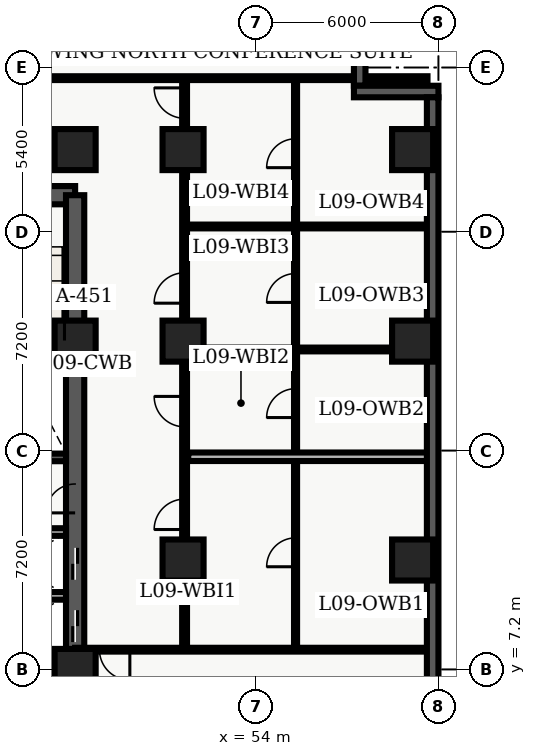
"""IFC4 building model, lengths in metres.
Left out: names, types, materials, properties, quantities, classifications, styles, units other than length and angle.
Written with IfcOpenShell. Run it as: python <this file> out.ifc"""

import sys

from ifc_helpers import new_model, entity, si_unit, converted_unit, direction, frame, origin_with_axes, origin_2d_with_axis, place, context, subcontext, project, spatial, polyline, rectangle, outline, extrude, element, fill, save


model = new_model("IFC4")
c1 = context("Model", 3, precision=1e-05, world=origin_with_axes(), true_north=direction((0.0, 1.0)))
c2 = subcontext(c1, "Body", "Model", "MODEL_VIEW")
j1 = project(units=[si_unit("LENGTHUNIT", "METRE"), converted_unit("PLANEANGLEUNIT", "DEGREE", entity("IfcPlaneAngleMeasure", 0.017), si_unit("PLANEANGLEUNIT", "RADIAN"), dimensions=[0, 0, 0, 0, 0, 0, 0])], contexts=[c1])
p1 = place(None, origin_with_axes())
s1 = spatial("IfcSite", under=j1, at=p1, CompositionType="ELEMENT")
p2 = place(p1, origin_with_axes())
s2 = spatial("IfcBuilding", under=s1, at=p2, CompositionType="ELEMENT")
p3 = place(p2, frame((0.0, 0.0, 40.5), z_axis=(0.0, 0.0, 1.0), x_axis=(1.0, 0.0, 0.0)))
s3 = spatial("IfcBuildingStorey", under=s2, at=p3, CompositionType="ELEMENT", Elevation=40.5)
p4 = place(p3, frame((40.2, 7.2, 0.0), z_axis=(0.0, 0.0, 1.0), x_axis=(1.0, 0.0, 0.0)))
e1 = element("IfcWall", 1, at=p4, inside=s3, PredefinedType="SHEAR", context=c2, shape_type="SweptSolid", body=[
    extrude(outline(polyline([(0.0, -0.3), (7.85, -0.3), (7.85, 0.3), (0.0, 0.3), (0.0, -0.3)])), origin_with_axes(), (0.0, 0.0, 1.0), 3.66),
])
p5 = place(p4, frame((2.175, 0.0, 0.0), z_axis=(0.0, 0.0, 1.0), x_axis=(1.0, 0.0, 0.0)))
e2 = element("IfcOpeningElement", 2, at=p5, cuts=e1, PredefinedType="OPENING", context=c2, shape_type="SweptSolid", body=[
    extrude(rectangle(XDim=1.05, YDim=0.62, at=origin_2d_with_axis()), origin_with_axes(), (0.0, 0.0, 1.0), 2.15),
])
p6 = place(p3, frame((40.2, 22.8, 0.0), z_axis=(0.0, 0.0, 1.0), x_axis=(1.0, 0.0, 0.0)))
e3 = element("IfcWall", 3, at=p6, inside=s3, PredefinedType="SHEAR", context=c2, shape_type="SweptSolid", body=[
    extrude(outline(polyline([(0.0, -0.3), (7.85, -0.3), (7.85, 0.3), (0.0, 0.3), (0.0, -0.3)])), origin_with_axes(), (0.0, 0.0, 1.0), 3.66),
])
p7 = place(p6, frame((5.775, 0.0, 0.0), z_axis=(0.0, 0.0, 1.0), x_axis=(1.0, 0.0, 0.0)))
e4 = element("IfcOpeningElement", 4, at=p7, cuts=e3, PredefinedType="OPENING", context=c2, shape_type="SweptSolid", body=[
    extrude(rectangle(XDim=1.05, YDim=0.62, at=origin_2d_with_axis()), origin_with_axes(), (0.0, 0.0, 1.0), 2.15),
])
p8 = place(p6, frame((2.15, 0.0, 0.0), z_axis=(0.0, 0.0, 1.0), x_axis=(1.0, 0.0, 0.0)))
e5 = element("IfcOpeningElement", 5, at=p8, cuts=e3, PredefinedType="OPENING", context=c2, shape_type="SweptSolid", body=[
    extrude(rectangle(XDim=0.9, YDim=0.62, at=origin_2d_with_axis()), origin_with_axes(), (0.0, 0.0, 1.0), 2.15),
])
p9 = place(p3, frame((48.05, 7.2, 0.0), z_axis=(0.0, 0.0, 1.0), x_axis=(0.0, 1.0, 0.0)))
e6 = element("IfcWall", 6, at=p9, inside=s3, PredefinedType="SHEAR", context=c2, shape_type="SweptSolid", body=[
    extrude(outline(polyline([(0.0, -0.3), (15.6, -0.3), (15.6, 0.3), (0.0, 0.3), (0.0, -0.3)])), origin_with_axes(), (0.0, 0.0, 1.0), 3.66),
])
p10 = place(p9, frame((1.425, 0.0, 0.0), z_axis=(0.0, 0.0, 1.0), x_axis=(1.0, 0.0, 0.0)))
e7 = element("IfcOpeningElement", 7, at=p10, cuts=e6, PredefinedType="OPENING", context=c2, shape_type="SweptSolid", body=[
    extrude(rectangle(XDim=1.05, YDim=0.62, at=origin_2d_with_axis()), origin_with_axes(), (0.0, 0.0, 1.0), 2.15),
])
p11 = place(p9, frame((3.475, 0.0, 0.0), z_axis=(0.0, 0.0, 1.0), x_axis=(1.0, 0.0, 0.0)))
e8 = element("IfcOpeningElement", 8, at=p11, cuts=e6, PredefinedType="OPENING", context=c2, shape_type="SweptSolid", body=[
    extrude(rectangle(XDim=1.05, YDim=0.62, at=origin_2d_with_axis()), origin_with_axes(), (0.0, 0.0, 1.0), 2.15),
])
p12 = place(p9, frame((5.625, 0.0, 0.0), z_axis=(0.0, 0.0, 1.0), x_axis=(1.0, 0.0, 0.0)))
e9 = element("IfcOpeningElement", 9, at=p12, cuts=e6, PredefinedType="OPENING", context=c2, shape_type="SweptSolid", body=[
    extrude(rectangle(XDim=0.95, YDim=0.62, at=origin_2d_with_axis()), origin_with_axes(), (0.0, 0.0, 1.0), 2.15),
])
p13 = place(p3, frame((44.25, 14.175, 0.0), z_axis=(0.0, 0.0, 1.0), x_axis=(1.0, 0.0, 0.0)))
e10 = element("IfcWall", 10, at=p13, inside=s3, PredefinedType="SHEAR", context=c2, shape_type="SweptSolid", body=[
    extrude(outline(polyline([(0.0, -0.125), (3.5, -0.125), (3.5, 0.125), (0.0, 0.125), (0.0, -0.125)])), origin_with_axes(), (0.0, 0.0, 1.0), 3.66),
])
for number, where, z_axis, x_axis in (
    (11, (48.05, 7.2, 0.0), (0.0, 0.0, 1.0), (1.0, 0.0, 0.0)),
    (12, (48.05, 18.0, 0.0), (0.0, 0.0, 1.0), (1.0, 0.0, 0.0)),
    (13, (48.05, 24.3, 0.0), (0.0, 0.0, 1.0), (1.0, 0.0, 0.0)),
    (14, (51.6, 10.8, 0.0), (0.0, 0.0, 1.0), (1.0, 0.0, 0.0)),
    (15, (51.6, 18.0, 0.0), (0.0, 0.0, 1.0), (1.0, 0.0, 0.0)),
    (16, (51.6, 24.3, 0.0), (0.0, 0.0, 1.0), (1.0, 0.0, 0.0)),
    (17, (59.15, 10.8, 0.0), (0.0, 0.0, 1.0), (1.0, 0.0, 0.0)),
    (18, (59.15, 18.0, 0.0), (0.0, 0.0, 1.0), (1.0, 0.0, 0.0)),
    (19, (59.15, 24.3, 0.0), (0.0, 0.0, 1.0), (1.0, 0.0, 0.0)),
):
    element("IfcColumn", number, at=place(p3, frame(where, z_axis=z_axis, x_axis=x_axis)), inside=s3, PredefinedType="COLUMN", context=c2, shape_type="SweptSolid", body=[
        extrude(rectangle(XDim=1.35, YDim=1.35, at=origin_2d_with_axis()), origin_with_axes(), (0.0, 0.0, 1.0), 3.9),
    ])
for number, where, z_axis, x_axis in (
    (20, (44.25, 9.62, 0.0), (0.0, 0.0, 1.0), (1.0, 0.0, 0.0)),
    (21, (44.25, 11.72, 0.0), (0.0, 0.0, 1.0), (1.0, 0.0, 0.0)),
):
    element("IfcWall", number, at=place(p3, frame(where, z_axis=z_axis, x_axis=x_axis)), inside=s3, PredefinedType="SOLIDWALL", context=c2, shape_type="SweptSolid", body=[
        extrude(outline(polyline([(0.0, -0.125), (3.5, -0.125), (3.5, 0.125), (0.0, 0.125), (0.0, -0.125)])), origin_with_axes(), (0.0, 0.0, 1.0), 2.7),
    ])
p14 = place(p3, frame((51.65, 7.85, 0.0), z_axis=(0.0, 0.0, 1.0), x_axis=(0.0, 1.0, 0.0)))
e22 = element("IfcWall", 22, at=p14, inside=s3, PredefinedType="PARTITIONING", context=c2, shape_type="SweptSolid", body=[
    extrude(outline(polyline([(0.0, -0.08), (18.8, -0.08), (18.8, 0.08), (0.0, 0.08), (0.0, -0.08)])), origin_with_axes(), (0.0, 0.0, 1.0), 2.7),
])
p15 = place(p14, frame((4.453, 0.0, 0.0), z_axis=(0.0, 0.0, 1.0), x_axis=(1.0, 0.0, 0.0)))
e23 = element("IfcOpeningElement", 23, at=p15, cuts=e22, PredefinedType="OPENING", context=c2, shape_type="SweptSolid", body=[
    extrude(rectangle(XDim=1.0, YDim=0.18, at=origin_2d_with_axis()), origin_with_axes(), (0.0, 0.0, 1.0), 2.15),
])
p16 = place(p14, frame((7.831, 0.0, 0.0), z_axis=(0.0, 0.0, 1.0), x_axis=(1.0, 0.0, 0.0)))
e24 = element("IfcOpeningElement", 24, at=p16, cuts=e22, PredefinedType="OPENING", context=c2, shape_type="SweptSolid", body=[
    extrude(rectangle(XDim=1.0, YDim=0.18, at=origin_2d_with_axis()), origin_with_axes(), (0.0, 0.0, 1.0), 2.15),
])
p17 = place(p14, frame((11.898, 0.0, 0.0), z_axis=(0.0, 0.0, 1.0), x_axis=(1.0, 0.0, 0.0)))
e25 = element("IfcOpeningElement", 25, at=p17, cuts=e22, PredefinedType="OPENING", context=c2, shape_type="SweptSolid", body=[
    extrude(rectangle(XDim=1.0, YDim=0.18, at=origin_2d_with_axis()), origin_with_axes(), (0.0, 0.0, 1.0), 2.15),
])
p18 = place(p14, frame((17.98, 0.0, 0.0), z_axis=(0.0, 0.0, 1.0), x_axis=(1.0, 0.0, 0.0)))
e26 = element("IfcOpeningElement", 26, at=p18, cuts=e22, PredefinedType="OPENING", context=c2, shape_type="SweptSolid", body=[
    extrude(rectangle(XDim=1.0, YDim=0.18, at=origin_2d_with_axis()), origin_with_axes(), (0.0, 0.0, 1.0), 2.15),
])
p19 = place(p3, frame((59.64, 7.85, 0.0), z_axis=(0.0, 0.0, 1.0), x_axis=(-1.0, 0.0, 0.0)))
e27 = element("IfcWall", 27, at=p19, inside=s3, PredefinedType="PARTITIONING", context=c2, shape_type="SweptSolid", body=[
    extrude(outline(polyline([(0.0, -0.062), (11.59, -0.062), (11.59, 0.062), (0.0, 0.062), (0.0, -0.062)])), origin_with_axes(), (0.0, 0.0, 1.0), 2.7),
])
p20 = place(p19, frame((10.29, 0.0, 0.0), z_axis=(0.0, 0.0, 1.0), x_axis=(1.0, 0.0, 0.0)))
e28 = element("IfcOpeningElement", 28, at=p20, cuts=e27, PredefinedType="OPENING", context=c2, shape_type="SweptSolid", body=[
    extrude(rectangle(XDim=1.0, YDim=0.145, at=origin_2d_with_axis()), origin_with_axes(), (0.0, 0.0, 1.0), 2.15),
])
p21 = place(p3, frame((38.76, 26.65, 0.0), z_axis=(0.0, 0.0, 1.0), x_axis=(1.0, 0.0, 0.0)))
e29 = element("IfcWall", 29, at=p21, inside=s3, PredefinedType="PARTITIONING", context=c2, shape_type="SweptSolid", body=[
    extrude(outline(polyline([(0.0, -0.062), (20.88, -0.062), (20.88, 0.062), (0.0, 0.062), (0.0, -0.062)])), origin_with_axes(), (0.0, 0.0, 1.0), 2.7),
])
p22 = place(p21, frame((4.24, 0.0, 0.0), z_axis=(0.0, 0.0, 1.0), x_axis=(1.0, 0.0, 0.0)))
e30 = element("IfcOpeningElement", 30, at=p22, cuts=e29, PredefinedType="OPENING", context=c2, shape_type="SweptSolid", body=[
    extrude(rectangle(XDim=1.0, YDim=0.145, at=origin_2d_with_axis()), origin_with_axes(), (0.0, 0.0, 1.0), 2.15),
])
p23 = place(p3, frame((55.3, 7.98, 0.0), z_axis=(0.0, 0.0, 1.0), x_axis=(0.0, 1.0, 0.0)))
e31 = element("IfcWall", 31, at=p23, inside=s3, PredefinedType="PARTITIONING", context=c2, shape_type="SweptSolid", body=[
    extrude(outline(polyline([(0.0, -0.05), (18.54, -0.05), (18.54, 0.05), (0.0, 0.05), (0.0, -0.05)])), origin_with_axes(), (0.0, 0.0, 1.0), 2.7),
])
p24 = place(p23, frame((3.073, 0.0, 0.0), z_axis=(0.0, 0.0, 1.0), x_axis=(1.0, 0.0, 0.0)))
e32 = element("IfcOpeningElement", 32, at=p24, cuts=e31, PredefinedType="OPENING", context=c2, shape_type="SweptSolid", body=[
    extrude(rectangle(XDim=0.95, YDim=0.12, at=origin_2d_with_axis()), origin_with_axes(), (0.0, 0.0, 1.0), 2.15),
])
p25 = place(p23, frame((7.981, 0.0, 0.0), z_axis=(0.0, 0.0, 1.0), x_axis=(1.0, 0.0, 0.0)))
e33 = element("IfcOpeningElement", 33, at=p25, cuts=e31, PredefinedType="OPENING", context=c2, shape_type="SweptSolid", body=[
    extrude(rectangle(XDim=0.95, YDim=0.12, at=origin_2d_with_axis()), origin_with_axes(), (0.0, 0.0, 1.0), 2.15),
])
p26 = place(p23, frame((11.768, 0.0, 0.0), z_axis=(0.0, 0.0, 1.0), x_axis=(1.0, 0.0, 0.0)))
e34 = element("IfcOpeningElement", 34, at=p26, cuts=e31, PredefinedType="OPENING", context=c2, shape_type="SweptSolid", body=[
    extrude(rectangle(XDim=0.95, YDim=0.12, at=origin_2d_with_axis()), origin_with_axes(), (0.0, 0.0, 1.0), 2.15),
])
p27 = place(p23, frame((16.201, 0.0, 0.0), z_axis=(0.0, 0.0, 1.0), x_axis=(1.0, 0.0, 0.0)))
e35 = element("IfcOpeningElement", 35, at=p27, cuts=e31, PredefinedType="OPENING", context=c2, shape_type="SweptSolid", body=[
    extrude(rectangle(XDim=0.95, YDim=0.12, at=origin_2d_with_axis()), origin_with_axes(), (0.0, 0.0, 1.0), 2.15),
])
p28 = place(p3, frame((51.77, 14.196, 0.0), z_axis=(0.0, 0.0, 1.0), x_axis=(1.0, 0.0, 0.0)))
e36 = element("IfcWall", 36, at=p28, inside=s3, PredefinedType="PARTITIONING", context=c2, shape_type="SweptSolid", body=[
    extrude(outline(polyline([(0.0, -0.14), (7.855, -0.14), (7.855, 0.14), (0.0, 0.14), (0.0, -0.14)])), origin_with_axes(), (0.0, 0.0, 1.0), 2.7),
])
for number, where, z_axis, x_axis in (
    (37, (51.77, 17.725, 0.0), (0.0, 0.0, 1.0), (1.0, 0.0, 0.0)),
    (38, (51.77, 21.771, 0.0), (0.0, 0.0, 1.0), (1.0, 0.0, 0.0)),
):
    element("IfcWall", number, at=place(p3, frame(where, z_axis=z_axis, x_axis=x_axis)), inside=s3, PredefinedType="PARTITIONING", context=c2, shape_type="SweptSolid", body=[
        extrude(outline(polyline([(0.0, -0.062), (7.855, -0.062), (7.855, 0.062), (0.0, 0.062), (0.0, -0.062)])), origin_with_axes(), (0.0, 0.0, 1.0), 2.7),
    ])
p29 = place(p3, frame((57.41, 28.42, 0.0), z_axis=(0.0, 0.0, 1.0), x_axis=(0.0, -1.0, 0.0)))
e39 = element("IfcWall", 39, at=p29, inside=s3, PredefinedType="SOLIDWALL", context=c2, shape_type="SweptSolid", body=[
    extrude(outline(polyline([(0.0, -0.19), (2.02, -0.19), (2.02, 0.19), (0.0, 0.19), (0.0, -0.19)])), origin_with_axes(), (0.0, 0.0, 1.0), 3.66),
])
p30 = place(p3, frame((57.22, 26.21, 0.0), z_axis=(0.0, 0.0, 1.0), x_axis=(1.0, 0.0, 0.0)))
e40 = element("IfcWall", 40, at=p30, inside=s3, PredefinedType="SOLIDWALL", context=c2, shape_type="SweptSolid", body=[
    extrude(outline(polyline([(0.0, -0.19), (2.78, -0.19), (2.78, 0.19), (0.0, 0.19), (0.0, -0.19)])), origin_with_axes(), (0.0, 0.0, 1.0), 3.66),
])
p31 = place(p3, frame((59.81, 26.02, 0.0), z_axis=(0.0, 0.0, 1.0), x_axis=(0.0, -1.0, 0.0)))
e41 = element("IfcWall", 41, at=p31, inside=s3, PredefinedType="SOLIDWALL", context=c2, shape_type="SweptSolid", body=[
    extrude(outline(polyline([(0.0, -0.19), (23.62, -0.19), (23.62, 0.19), (0.0, 0.19), (0.0, -0.19)])), origin_with_axes(), (0.0, 0.0, 1.0), 3.66),
])
p32 = place(p31, frame((20.218, 0.0, 0.45), z_axis=(0.0, 0.0, 1.0), x_axis=(1.0, 0.0, 0.0)))
e42 = element("IfcOpeningElement", 42, at=p32, cuts=e41, PredefinedType="OPENING", context=c2, shape_type="SweptSolid", body=[
    extrude(rectangle(XDim=2.1, YDim=0.4, at=origin_2d_with_axis()), origin_with_axes(), (0.0, 0.0, 1.0), 2.2),
])
p33 = place(p9, frame((1.425, 0.0, 0.0), z_axis=(0.0, 0.0, 1.0), x_axis=(1.0, 0.0, 0.0)))
e43 = element("IfcDoor", 43, at=p33, inside=s3, OperationType="SLIDING_TO_LEFT", PredefinedType="DOOR", context=c2, shape_type="SweptSolid", body=[
    extrude(rectangle(XDim=1.05, YDim=0.09, at=origin_2d_with_axis()), origin_with_axes(), (0.0, 0.0, 1.0), 2.15),
])
fill(e7, e43)
p34 = place(p9, frame((3.475, 0.0, 0.0), z_axis=(0.0, 0.0, 1.0), x_axis=(1.0, 0.0, 0.0)))
e44 = element("IfcDoor", 44, at=p34, inside=s3, OperationType="SLIDING_TO_RIGHT", PredefinedType="DOOR", context=c2, shape_type="SweptSolid", body=[
    extrude(rectangle(XDim=1.05, YDim=0.09, at=origin_2d_with_axis()), origin_with_axes(), (0.0, 0.0, 1.0), 2.15),
])
fill(e8, e44)
p35 = place(p9, frame((5.625, 0.0, 0.0), z_axis=(0.0, 0.0, 1.0), x_axis=(1.0, 0.0, 0.0)))
e45 = element("IfcDoor", 45, at=p35, inside=s3, OperationType="SINGLE_SWING_LEFT", PredefinedType="DOOR", context=c2, shape_type="SweptSolid", body=[
    extrude(rectangle(XDim=0.95, YDim=0.09, at=origin_2d_with_axis()), origin_with_axes(), (0.0, 0.0, 1.0), 2.15),
])
fill(e9, e45)
p36 = place(p19, frame((10.29, 0.0, 0.0), z_axis=(0.0, 0.0, 1.0), x_axis=(1.0, 0.0, 0.0)))
e46 = element("IfcDoor", 46, at=p36, inside=s3, OperationType="SINGLE_SWING_LEFT", PredefinedType="DOOR", context=c2, shape_type="SweptSolid", body=[
    extrude(rectangle(XDim=1.0, YDim=0.075, at=origin_2d_with_axis()), origin_with_axes(), (0.0, 0.0, 1.0), 2.15),
])
fill(e28, e46)
p37 = place(p23, frame((3.073, 0.0, 0.0), z_axis=(0.0, 0.0, 1.0), x_axis=(1.0, 0.0, 0.0)))
e47 = element("IfcDoor", 47, at=p37, inside=s3, OperationType="SINGLE_SWING_LEFT", PredefinedType="DOOR", context=c2, shape_type="SweptSolid", body=[
    extrude(rectangle(XDim=0.95, YDim=0.06, at=origin_2d_with_axis()), origin_with_axes(), (0.0, 0.0, 1.0), 2.15),
])
fill(e32, e47)
p38 = place(p14, frame((4.453, 0.0, 0.0), z_axis=(0.0, 0.0, 1.0), x_axis=(1.0, 0.0, 0.0)))
e48 = element("IfcDoor", 48, at=p38, inside=s3, OperationType="SINGLE_SWING_LEFT", PredefinedType="DOOR", context=c2, shape_type="SweptSolid", body=[
    extrude(rectangle(XDim=1.0, YDim=0.09, at=origin_2d_with_axis()), origin_with_axes(), (0.0, 0.0, 1.0), 2.15),
])
fill(e23, e48)
p39 = place(p23, frame((7.981, 0.0, 0.0), z_axis=(0.0, 0.0, 1.0), x_axis=(1.0, 0.0, 0.0)))
e49 = element("IfcDoor", 49, at=p39, inside=s3, OperationType="SINGLE_SWING_LEFT", PredefinedType="DOOR", context=c2, shape_type="SweptSolid", body=[
    extrude(rectangle(XDim=0.95, YDim=0.06, at=origin_2d_with_axis()), origin_with_axes(), (0.0, 0.0, 1.0), 2.15),
])
fill(e33, e49)
p40 = place(p14, frame((7.831, 0.0, 0.0), z_axis=(0.0, 0.0, 1.0), x_axis=(1.0, 0.0, 0.0)))
e50 = element("IfcDoor", 50, at=p40, inside=s3, OperationType="SINGLE_SWING_RIGHT", PredefinedType="DOOR", context=c2, shape_type="SweptSolid", body=[
    extrude(rectangle(XDim=1.0, YDim=0.09, at=origin_2d_with_axis()), origin_with_axes(), (0.0, 0.0, 1.0), 2.15),
])
fill(e24, e50)
p41 = place(p23, frame((11.768, 0.0, 0.0), z_axis=(0.0, 0.0, 1.0), x_axis=(1.0, 0.0, 0.0)))
e51 = element("IfcDoor", 51, at=p41, inside=s3, OperationType="SINGLE_SWING_LEFT", PredefinedType="DOOR", context=c2, shape_type="SweptSolid", body=[
    extrude(rectangle(XDim=0.95, YDim=0.06, at=origin_2d_with_axis()), origin_with_axes(), (0.0, 0.0, 1.0), 2.15),
])
fill(e34, e51)
p42 = place(p14, frame((11.898, 0.0, 0.0), z_axis=(0.0, 0.0, 1.0), x_axis=(1.0, 0.0, 0.0)))
e52 = element("IfcDoor", 52, at=p42, inside=s3, OperationType="SINGLE_SWING_LEFT", PredefinedType="DOOR", context=c2, shape_type="SweptSolid", body=[
    extrude(rectangle(XDim=1.0, YDim=0.09, at=origin_2d_with_axis()), origin_with_axes(), (0.0, 0.0, 1.0), 2.15),
])
fill(e25, e52)
p43 = place(p23, frame((16.201, 0.0, 0.0), z_axis=(0.0, 0.0, 1.0), x_axis=(1.0, 0.0, 0.0)))
e53 = element("IfcDoor", 53, at=p43, inside=s3, OperationType="SINGLE_SWING_LEFT", PredefinedType="DOOR", context=c2, shape_type="SweptSolid", body=[
    extrude(rectangle(XDim=0.95, YDim=0.06, at=origin_2d_with_axis()), origin_with_axes(), (0.0, 0.0, 1.0), 2.15),
])
fill(e35, e53)
p44 = place(p14, frame((17.98, 0.0, 0.0), z_axis=(0.0, 0.0, 1.0), x_axis=(1.0, 0.0, 0.0)))
e54 = element("IfcDoor", 54, at=p44, inside=s3, OperationType="SINGLE_SWING_RIGHT", PredefinedType="DOOR", context=c2, shape_type="SweptSolid", body=[
    extrude(rectangle(XDim=1.0, YDim=0.09, at=origin_2d_with_axis()), origin_with_axes(), (0.0, 0.0, 1.0), 2.15),
])
fill(e26, e54)
save(model, sys.argv[1])
